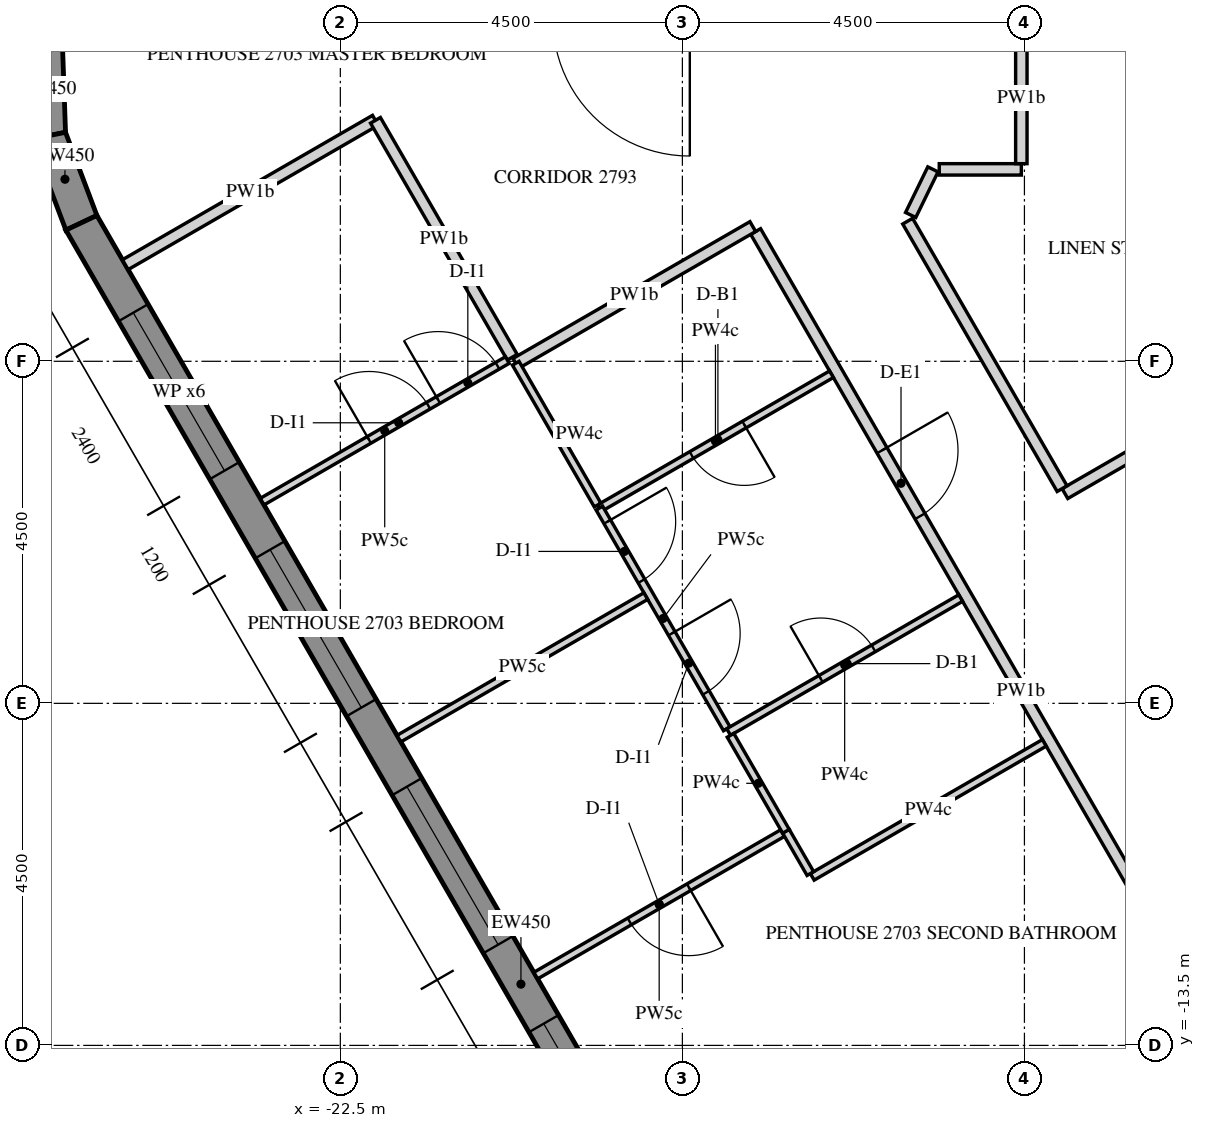
"""IFC4 building model, lengths in metres.
Left out: names, types, materials, properties, quantities, classifications, styles, units other than length and angle.
Written with IfcOpenShell. Run it as: python <this file> out.ifc"""

import sys

from ifc_helpers import new_model, si_unit, direction, frame, frame_2d, origin, place, context, subcontext, project, spatial, polyline, rectangle, outline, extrude, element, fill, save


model = new_model("IFC4")
c1 = context("Model", 3, precision=1e-05, world=origin(), true_north=direction((0.0, 1.0)))
c2 = subcontext(c1, "Body", "Model", "MODEL_VIEW")
j1 = project(units=[si_unit("LENGTHUNIT", "METRE"), si_unit("PLANEANGLEUNIT", "RADIAN")], contexts=[c1])
p1 = place(None, origin())
s1 = spatial("IfcSite", under=j1, at=p1, CompositionType="ELEMENT")
p2 = place(p1, origin())
s2 = spatial("IfcBuilding", under=s1, at=p2, CompositionType="ELEMENT")
p3 = place(p2, frame((0.0, 0.0, 353.4)))
s3 = spatial("IfcBuildingStorey", under=s2, at=p3, CompositionType="ELEMENT", Elevation=353.4)
p4 = place(p3, frame((-26.382, -0.309, -0.15), z_axis=(0.0, 0.0, 1.0), x_axis=(0.034887984255, -0.999391228976, 0.0)))
e1 = element("IfcWall", 1, at=p4, inside=s3, PredefinedType="SOLIDWALL", context=c2, shape_type="SweptSolid", body=[
    extrude(outline(polyline([(-0.037, -0.225), (1.261, -0.225), (1.188, 0.225), (0.037, 0.225), (-0.037, -0.225)])), origin(), (0.0, 0.0, 1.0), 3.9),
])
p5 = place(p3, frame((-26.339, -1.532, -0.15), z_axis=(0.0, 0.0, 1.0), x_axis=(0.353132996235, -0.935573132882, 0.0)))
e2 = element("IfcWall", 2, at=p5, inside=s3, PredefinedType="SOLIDWALL", context=c2, shape_type="SweptSolid", body=[
    extrude(outline(polyline([(-0.037, -0.225), (1.243, -0.225), (1.206, 0.225), (0.037, 0.225), (-0.037, -0.225)])), origin(), (0.0, 0.0, 1.0), 3.9),
])
p6 = place(p3, frame((-25.907, -2.678, -0.15), z_axis=(0.0, 0.0, 1.0), x_axis=(0.499997453958, -0.866026873738, 0.0)))
e3 = element("IfcWall", 3, at=p6, inside=s3, PredefinedType="SOLIDWALL", context=c2, shape_type="SweptSolid", body=[
    extrude(outline(polyline([(-0.018, -0.225), (23.152, -0.225), (23.11, 0.225), (0.018, 0.225), (-0.018, -0.225)])), origin(), (0.0, 0.0, 1.0), 3.9),
])
p7 = place(p6, frame((1.366, 0.0, 0.45)))
e4 = element("IfcOpeningElement", 4, at=p7, cuts=e3, PredefinedType="OPENING", context=c2, shape_type="SweptSolid", body=[
    extrude(rectangle(XDim=2.4, YDim=3.0, at=frame_2d((1.2, 1.5))), frame((0.0, 0.235, 0.0), z_axis=(0.0, -1.0, 0.0), x_axis=(1.0, 0.0, 0.0)), (0.0, 0.0, 1.0), 0.47),
])
p8 = place(p6, frame((4.966, 0.0, 0.45)))
e5 = element("IfcOpeningElement", 5, at=p8, cuts=e3, PredefinedType="OPENING", context=c2, shape_type="SweptSolid", body=[
    extrude(rectangle(XDim=2.4, YDim=3.0, at=frame_2d((1.2, 1.5))), frame((0.0, 0.235, 0.0), z_axis=(0.0, -1.0, 0.0), x_axis=(1.0, 0.0, 0.0)), (0.0, 0.0, 1.0), 0.47),
])
p9 = place(p6, frame((8.566, 0.0, 0.45)))
e6 = element("IfcOpeningElement", 6, at=p9, cuts=e3, PredefinedType="OPENING", context=c2, shape_type="SweptSolid", body=[
    extrude(rectangle(XDim=2.4, YDim=3.0, at=frame_2d((1.2, 1.5))), frame((0.0, 0.235, 0.0), z_axis=(0.0, -1.0, 0.0), x_axis=(1.0, 0.0, 0.0)), (0.0, 0.0, 1.0), 0.47),
])
p10 = place(p6, frame((12.166, 0.0, 0.45)))
e7 = element("IfcOpeningElement", 7, at=p10, cuts=e3, PredefinedType="OPENING", context=c2, shape_type="SweptSolid", body=[
    extrude(rectangle(XDim=2.4, YDim=3.0, at=frame_2d((1.2, 1.5))), frame((0.0, 0.235, 0.0), z_axis=(0.0, -1.0, 0.0), x_axis=(1.0, 0.0, 0.0)), (0.0, 0.0, 1.0), 0.47),
])
p11 = place(p6, frame((15.766, 0.0, 0.45)))
e8 = element("IfcOpeningElement", 8, at=p11, cuts=e3, PredefinedType="OPENING", context=c2, shape_type="SweptSolid", body=[
    extrude(rectangle(XDim=2.4, YDim=3.0, at=frame_2d((1.2, 1.5))), frame((0.0, 0.235, 0.0), z_axis=(0.0, -1.0, 0.0), x_axis=(1.0, 0.0, 0.0)), (0.0, 0.0, 1.0), 0.47),
])
p12 = place(p6, frame((19.366, 0.0, 0.45)))
e9 = element("IfcOpeningElement", 9, at=p12, cuts=e3, PredefinedType="OPENING", context=c2, shape_type="SweptSolid", body=[
    extrude(rectangle(XDim=2.4, YDim=3.0, at=frame_2d((1.2, 1.5))), frame((0.0, 0.235, 0.0), z_axis=(0.0, -1.0, 0.0), x_axis=(1.0, 0.0, 0.0)), (0.0, 0.0, 1.0), 0.47),
])
p13 = place(p3, frame((-17.036, -2.792, 0.0), z_axis=(0.0, 0.0, 1.0), x_axis=(0.500006428338, -0.86602169235, 0.0)))
e10 = element("IfcWall", 10, at=p13, inside=s3, PredefinedType="PARTITIONING", context=c2, shape_type="SweptSolid", body=[
    extrude(rectangle(XDim=13.966, YDim=0.15, at=frame_2d((6.983, 0.0))), origin(), (0.0, 0.0, 1.0), 2.82),
])
p14 = place(p13, frame((3.325, 0.0, 0.0)))
e11 = element("IfcOpeningElement", 11, at=p14, cuts=e10, PredefinedType="OPENING", context=c2, shape_type="SweptSolid", body=[
    extrude(rectangle(XDim=1.0, YDim=2.1, at=frame_2d((0.5, 1.05))), frame((0.0, 0.085, 0.0), z_axis=(0.0, -1.0, 0.0), x_axis=(1.0, 0.0, 0.0)), (0.0, 0.0, 1.0), 0.17),
])
p15 = place(p3, frame((-20.191, -4.528, 0.0), z_axis=(0.0, 0.0, 1.0), x_axis=(0.866018442252, 0.500012057535, 0.0)))
e12 = element("IfcWall", 12, at=p15, inside=s3, PredefinedType="PARTITIONING", context=c2, shape_type="SweptSolid", body=[
    extrude(rectangle(XDim=3.6, YDim=0.15, at=frame_2d((1.8, 0.0))), origin(), (0.0, 0.0, 1.0), 2.82),
])
p16 = place(p3, frame((-25.329, -3.229, 0.0), z_axis=(0.0, 0.0, 1.0), x_axis=(0.866019695343, 0.500009887181, 0.0)))
e13 = element("IfcWall", 13, at=p16, inside=s3, PredefinedType="PARTITIONING", context=c2, shape_type="SweptSolid", body=[
    extrude(rectangle(XDim=3.799, YDim=0.15, at=frame_2d((1.899, 0.0))), origin(), (0.0, 0.0, 1.0), 2.82),
])
p17 = place(p3, frame((-22.038, -1.33, 0.0), z_axis=(0.0, 0.0, 1.0), x_axis=(0.499976924066, -0.866038726271, 0.0)))
e14 = element("IfcWall", 14, at=p17, inside=s3, PredefinedType="PARTITIONING", context=c2, shape_type="SweptSolid", body=[
    extrude(rectangle(XDim=3.599, YDim=0.15, at=frame_2d((1.799, 0.0))), origin(), (0.0, 0.0, 1.0), 2.82),
])
p18 = place(p3, frame((-9.2, -4.066, 0.0), z_axis=(0.0, 0.0, 1.0), x_axis=(-0.866013608182, -0.500020430026, 0.0)))
e15 = element("IfcWall", 15, at=p18, inside=s3, PredefinedType="PARTITIONING", context=c2, shape_type="SweptSolid", body=[
    extrude(rectangle(XDim=4.35, YDim=0.15, at=frame_2d((2.175, 0.0))), origin(), (0.0, 0.0, 1.0), 2.82),
])
p19 = place(p18, frame((1.725, 0.0, 0.0)))
e16 = element("IfcOpeningElement", 16, at=p19, cuts=e15, PredefinedType="OPENING", context=c2, shape_type="SweptSolid", body=[
    extrude(rectangle(XDim=0.9, YDim=2.1, at=frame_2d((0.45, 1.05))), frame((0.0, 0.085, 0.0), z_axis=(0.0, -1.0, 0.0), x_axis=(1.0, 0.0, 0.0)), (0.0, 0.0, 1.0), 0.17),
])
p20 = place(p3, frame((-13.004, -6.176, 0.0), z_axis=(0.0, 0.0, 1.0), x_axis=(-0.500022342669, 0.866012503854, 0.0)))
e17 = element("IfcWall", 17, at=p20, inside=s3, PredefinedType="PARTITIONING", context=c2, shape_type="SweptSolid", body=[
    extrude(rectangle(XDim=4.064, YDim=0.15, at=frame_2d((2.032, 0.0))), origin(), (0.0, 0.0, 1.0), 2.82),
])
p21 = place(p3, frame((-14.997, -2.575, 0.0), z_axis=(0.0, 0.0, 1.0), x_axis=(0.438416427913, 0.898771959808, 0.0)))
e18 = element("IfcWall", 18, at=p21, inside=s3, PredefinedType="PARTITIONING", context=c2, shape_type="SweptSolid", body=[
    extrude(rectangle(XDim=0.668, YDim=0.15, at=frame_2d((0.334, 0.0))), origin(), (0.0, 0.0, 1.0), 2.82),
])
p22 = place(p3, frame((-14.62, -1.975, 0.0), z_axis=(0.0, 0.0, 1.0), x_axis=(1.0, 0.0, 0.0)))
e19 = element("IfcWall", 19, at=p22, inside=s3, PredefinedType="PARTITIONING", context=c2, shape_type="SweptSolid", body=[
    extrude(rectangle(XDim=1.08, YDim=0.15, at=frame_2d((0.54, 0.0))), origin(), (0.0, 0.0, 1.0), 2.82),
])
p23 = place(p3, frame((-13.541, -1.9, 0.0), z_axis=(0.0, 0.0, 1.0), x_axis=(0.0, 1.0, 0.0)))
e20 = element("IfcWall", 20, at=p23, inside=s3, PredefinedType="PARTITIONING", context=c2, shape_type="SweptSolid", body=[
    extrude(rectangle(XDim=1.725, YDim=0.15, at=frame_2d((0.862, 0.0))), origin(), (0.0, 0.0, 1.0), 2.82),
])
p24 = place(p3, frame((-16.681, -10.707, 0.0), z_axis=(0.0, 0.0, 1.0), x_axis=(-0.866039234136, -0.499976044363, 0.0)))
e21 = element("IfcWall", 21, at=p24, inside=s3, PredefinedType="PARTITIONING", context=c2, shape_type="SweptSolid", body=[
    extrude(rectangle(XDim=3.75, YDim=0.1, at=frame_2d((1.875, 0.0))), origin(), (0.0, 0.0, 1.0), 2.82),
])
p25 = place(p24, frame((1.425, 0.0, 0.0)))
e22 = element("IfcOpeningElement", 22, at=p25, cuts=e21, PredefinedType="OPENING", context=c2, shape_type="SweptSolid", body=[
    extrude(rectangle(XDim=0.9, YDim=2.1, at=frame_2d((0.45, 1.05))), frame((0.0, 0.06, 0.0), z_axis=(0.0, -1.0, 0.0), x_axis=(1.0, 0.0, 0.0)), (0.0, 0.0, 1.0), 0.12),
])
p26 = place(p3, frame((-13.239, -9.52, 0.0), z_axis=(0.0, 0.0, 1.0), x_axis=(-0.866031034943, -0.499990246421, 0.0)))
e23 = element("IfcWall", 23, at=p26, inside=s3, PredefinedType="PARTITIONING", context=c2, shape_type="SweptSolid", body=[
    extrude(rectangle(XDim=3.525, YDim=0.1, at=frame_2d((1.762, 0.0))), origin(), (0.0, 0.0, 1.0), 2.82),
])
p27 = place(p3, frame((-16.316, -11.239, 0.0), z_axis=(0.0, 0.0, 1.0), x_axis=(-0.499962526042, 0.866047038303, 0.0)))
e24 = element("IfcWall", 24, at=p27, inside=s3, PredefinedType="PARTITIONING", context=c2, shape_type="SweptSolid", body=[
    extrude(rectangle(XDim=0.646, YDim=0.1, at=frame_2d((0.323, 0.0))), origin(), (0.0, 0.0, 1.0), 2.82),
])
p28 = place(p3, frame((-16.039, -4.67, 0.0), z_axis=(0.0, 0.0, 1.0), x_axis=(-0.866031034943, -0.499990246421, 0.0)))
e25 = element("IfcWall", 25, at=p28, inside=s3, PredefinedType="PARTITIONING", context=c2, shape_type="SweptSolid", body=[
    extrude(rectangle(XDim=3.525, YDim=0.1, at=frame_2d((1.762, 0.0))), origin(), (0.0, 0.0, 1.0), 2.82),
])
p29 = place(p28, frame((1.325, 0.0, 0.0)))
e26 = element("IfcOpeningElement", 26, at=p29, cuts=e25, PredefinedType="OPENING", context=c2, shape_type="SweptSolid", body=[
    extrude(rectangle(XDim=0.8, YDim=2.1, at=frame_2d((0.4, 1.05))), frame((0.0, 0.06, 0.0), z_axis=(0.0, -1.0, 0.0), x_axis=(1.0, 0.0, 0.0)), (0.0, 0.0, 1.0), 0.12),
])
p30 = place(p3, frame((-19.092, -6.431, 0.0), z_axis=(0.0, 0.0, 1.0), x_axis=(0.500014404596, -0.866017087127, 0.0)))
e27 = element("IfcWall", 27, at=p30, inside=s3, PredefinedType="PARTITIONING", context=c2, shape_type="SweptSolid", body=[
    extrude(rectangle(XDim=3.354, YDim=0.1, at=frame_2d((1.677, 0.0))), origin(), (0.0, 0.0, 1.0), 2.82),
])
p31 = place(p30, frame((0.208, 0.0, 0.0)))
e28 = element("IfcOpeningElement", 28, at=p31, cuts=e27, PredefinedType="OPENING", context=c2, shape_type="SweptSolid", body=[
    extrude(rectangle(XDim=0.9, YDim=2.1, at=frame_2d((0.45, 1.05))), frame((0.0, 0.06, 0.0), z_axis=(0.0, -1.0, 0.0), x_axis=(1.0, 0.0, 0.0)), (0.0, 0.0, 1.0), 0.12),
])
p32 = place(p30, frame((1.905, 0.0, 0.0)))
e29 = element("IfcOpeningElement", 29, at=p32, cuts=e27, PredefinedType="OPENING", context=c2, shape_type="SweptSolid", body=[
    extrude(rectangle(XDim=0.9, YDim=2.1, at=frame_2d((0.45, 1.05))), frame((0.0, 0.06, 0.0), z_axis=(0.0, -1.0, 0.0), x_axis=(1.0, 0.0, 0.0)), (0.0, 0.0, 1.0), 0.12),
])
p33 = place(p3, frame((-17.391, -9.377, 0.0), z_axis=(0.0, 0.0, 1.0), x_axis=(0.866001044215, 0.500042189638, 0.0)))
e30 = element("IfcWall", 30, at=p33, inside=s3, PredefinedType="PARTITIONING", context=c2, shape_type="SweptSolid", body=[
    extrude(rectangle(XDim=3.525, YDim=0.1, at=frame_2d((1.763, 0.0))), origin(), (0.0, 0.0, 1.0), 2.82),
])
p34 = place(p33, frame((1.4, 0.0, 0.0)))
e31 = element("IfcOpeningElement", 31, at=p34, cuts=e30, PredefinedType="OPENING", context=c2, shape_type="SweptSolid", body=[
    extrude(rectangle(XDim=0.8, YDim=2.1, at=frame_2d((0.4, 1.05))), frame((0.0, 0.06, 0.0), z_axis=(0.0, -1.0, 0.0), x_axis=(1.0, 0.0, 0.0)), (0.0, 0.0, 1.0), 0.12),
])
p35 = place(p3, frame((-20.192, -4.526, 0.0), z_axis=(0.0, 0.0, 1.0), x_axis=(0.500039660922, -0.86600250433, 0.0)))
e32 = element("IfcWall", 32, at=p35, inside=s3, PredefinedType="PARTITIONING", context=c2, shape_type="SweptSolid", body=[
    extrude(rectangle(XDim=2.154, YDim=0.1, at=frame_2d((1.077, 0.0))), origin(), (0.0, 0.0, 1.0), 2.82),
])
p36 = place(p3, frame((-23.529, -6.346, 0.0), z_axis=(0.0, 0.0, 1.0), x_axis=(0.866012039196, 0.500023147432, 0.0)))
e33 = element("IfcWall", 33, at=p36, inside=s3, PredefinedType="PARTITIONING", context=c2, shape_type="SweptSolid", body=[
    extrude(rectangle(XDim=3.725, YDim=0.1, at=frame_2d((1.862, 0.0))), origin(), (0.0, 0.0, 1.0), 2.82),
])
p37 = place(p36, frame((2.675, 0.0, 0.0)))
e34 = element("IfcOpeningElement", 34, at=p37, cuts=e33, PredefinedType="OPENING", context=c2, shape_type="SweptSolid", body=[
    extrude(rectangle(XDim=0.9, YDim=2.1, at=frame_2d((0.45, 1.05))), frame((0.0, 0.06, 0.0), z_axis=(0.0, -1.0, 0.0), x_axis=(1.0, 0.0, 0.0)), (0.0, 0.0, 1.0), 0.12),
])
p38 = place(p36, frame((1.625, 0.0, 0.0)))
e35 = element("IfcOpeningElement", 35, at=p38, cuts=e33, PredefinedType="OPENING", context=c2, shape_type="SweptSolid", body=[
    extrude(rectangle(XDim=0.9, YDim=2.1, at=frame_2d((0.45, 1.05))), frame((0.0, 0.06, 0.0), z_axis=(0.0, -1.0, 0.0), x_axis=(1.0, 0.0, 0.0)), (0.0, 0.0, 1.0), 0.12),
])
p39 = place(p3, frame((-21.729, -9.464, 0.0), z_axis=(0.0, 0.0, 1.0), x_axis=(0.866022959057, 0.500004234368, 0.0)))
e36 = element("IfcWall", 36, at=p39, inside=s3, PredefinedType="PARTITIONING", context=c2, shape_type="SweptSolid", body=[
    extrude(rectangle(XDim=3.75, YDim=0.1, at=frame_2d((1.875, 0.0))), origin(), (0.0, 0.0, 1.0), 2.82),
])
p40 = place(p3, frame((-16.637, -10.684, 0.0), z_axis=(0.0, 0.0, 1.0), x_axis=(-0.500046085413, 0.865998794724, 0.0)))
e37 = element("IfcWall", 37, at=p40, inside=s3, PredefinedType="PARTITIONING", context=c2, shape_type="SweptSolid", body=[
    extrude(rectangle(XDim=1.458, YDim=0.1, at=frame_2d((0.729, 0.0))), origin(), (0.0, 0.0, 1.0), 2.82),
])
p41 = place(p7, frame((0.0, 0.155, 0.0)))
e38 = element("IfcWindow", 38, at=p41, inside=s3, PartitioningType="DOUBLE_PANEL_VERTICAL", PredefinedType="WINDOW", context=c2, shape_type="SweptSolid", body=[
    extrude(rectangle(XDim=2.4, YDim=3.0, at=frame_2d((1.2, 1.5))), frame((0.0, 0.03, 0.0), z_axis=(0.0, -1.0, 0.0), x_axis=(1.0, 0.0, 0.0)), (0.0, 0.0, 1.0), 0.06),
])
fill(e4, e38)
p42 = place(p8, frame((0.0, 0.155, 0.0)))
e39 = element("IfcWindow", 39, at=p42, inside=s3, PartitioningType="DOUBLE_PANEL_VERTICAL", PredefinedType="WINDOW", context=c2, shape_type="SweptSolid", body=[
    extrude(rectangle(XDim=2.4, YDim=3.0, at=frame_2d((1.2, 1.5))), frame((0.0, 0.03, 0.0), z_axis=(0.0, -1.0, 0.0), x_axis=(1.0, 0.0, 0.0)), (0.0, 0.0, 1.0), 0.06),
])
fill(e5, e39)
p43 = place(p9, frame((0.0, 0.155, 0.0)))
e40 = element("IfcWindow", 40, at=p43, inside=s3, PartitioningType="DOUBLE_PANEL_VERTICAL", PredefinedType="WINDOW", context=c2, shape_type="SweptSolid", body=[
    extrude(rectangle(XDim=2.4, YDim=3.0, at=frame_2d((1.2, 1.5))), frame((0.0, 0.03, 0.0), z_axis=(0.0, -1.0, 0.0), x_axis=(1.0, 0.0, 0.0)), (0.0, 0.0, 1.0), 0.06),
])
fill(e6, e40)
p44 = place(p10, frame((0.0, 0.155, 0.0)))
e41 = element("IfcWindow", 41, at=p44, inside=s3, PartitioningType="DOUBLE_PANEL_VERTICAL", PredefinedType="WINDOW", context=c2, shape_type="SweptSolid", body=[
    extrude(rectangle(XDim=2.4, YDim=3.0, at=frame_2d((1.2, 1.5))), frame((0.0, 0.03, 0.0), z_axis=(0.0, -1.0, 0.0), x_axis=(1.0, 0.0, 0.0)), (0.0, 0.0, 1.0), 0.06),
])
fill(e7, e41)
p45 = place(p14, origin())
e42 = element("IfcDoor", 42, at=p45, inside=s3, OperationType="SINGLE_SWING_RIGHT", PredefinedType="DOOR", context=c2, shape_type="SweptSolid", body=[
    extrude(rectangle(XDim=1.0, YDim=2.1, at=frame_2d((0.5, 1.05))), frame((0.0, 0.025, 0.0), z_axis=(0.0, -1.0, 0.0), x_axis=(1.0, 0.0, 0.0)), (0.0, 0.0, 1.0), 0.05),
])
fill(e11, e42)
p46 = place(p29, origin())
e43 = element("IfcDoor", 43, at=p46, inside=s3, OperationType="SINGLE_SWING_RIGHT", PredefinedType="DOOR", context=c2, shape_type="SweptSolid", body=[
    extrude(rectangle(XDim=0.8, YDim=2.1, at=frame_2d((0.4, 1.05))), frame((0.0, 0.025, 0.0), z_axis=(0.0, -1.0, 0.0), x_axis=(1.0, 0.0, 0.0)), (0.0, 0.0, 1.0), 0.05),
])
fill(e26, e43)
p47 = place(p31, origin())
e44 = element("IfcDoor", 44, at=p47, inside=s3, OperationType="SINGLE_SWING_LEFT", PredefinedType="DOOR", context=c2, shape_type="SweptSolid", body=[
    extrude(rectangle(XDim=0.9, YDim=2.1, at=frame_2d((0.45, 1.05))), frame((0.0, 0.025, 0.0), z_axis=(0.0, -1.0, 0.0), x_axis=(1.0, 0.0, 0.0)), (0.0, 0.0, 1.0), 0.05),
])
fill(e28, e44)
p48 = place(p37, origin())
e45 = element("IfcDoor", 45, at=p48, inside=s3, OperationType="SINGLE_SWING_RIGHT", PredefinedType="DOOR", context=c2, shape_type="SweptSolid", body=[
    extrude(rectangle(XDim=0.9, YDim=2.1, at=frame_2d((0.45, 1.05))), frame((0.0, 0.025, 0.0), z_axis=(0.0, -1.0, 0.0), x_axis=(1.0, 0.0, 0.0)), (0.0, 0.0, 1.0), 0.05),
])
fill(e34, e45)
p49 = place(p38, origin())
e46 = element("IfcDoor", 46, at=p49, inside=s3, OperationType="SINGLE_SWING_LEFT", PredefinedType="DOOR", context=c2, shape_type="SweptSolid", body=[
    extrude(rectangle(XDim=0.9, YDim=2.1, at=frame_2d((0.45, 1.05))), frame((0.0, 0.025, 0.0), z_axis=(0.0, -1.0, 0.0), x_axis=(1.0, 0.0, 0.0)), (0.0, 0.0, 1.0), 0.05),
])
fill(e35, e46)
p50 = place(p32, origin())
e47 = element("IfcDoor", 47, at=p50, inside=s3, OperationType="SINGLE_SWING_LEFT", PredefinedType="DOOR", context=c2, shape_type="SweptSolid", body=[
    extrude(rectangle(XDim=0.9, YDim=2.1, at=frame_2d((0.45, 1.05))), frame((0.0, 0.025, 0.0), z_axis=(0.0, -1.0, 0.0), x_axis=(1.0, 0.0, 0.0)), (0.0, 0.0, 1.0), 0.05),
])
fill(e29, e47)
p51 = place(p34, origin())
e48 = element("IfcDoor", 48, at=p51, inside=s3, OperationType="SINGLE_SWING_LEFT", PredefinedType="DOOR", context=c2, shape_type="SweptSolid", body=[
    extrude(rectangle(XDim=0.8, YDim=2.1, at=frame_2d((0.4, 1.05))), frame((0.0, 0.025, 0.0), z_axis=(0.0, -1.0, 0.0), x_axis=(1.0, 0.0, 0.0)), (0.0, 0.0, 1.0), 0.05),
])
fill(e31, e48)
p52 = place(p25, origin())
e49 = element("IfcDoor", 49, at=p52, inside=s3, OperationType="SINGLE_SWING_RIGHT", PredefinedType="DOOR", context=c2, shape_type="SweptSolid", body=[
    extrude(rectangle(XDim=0.9, YDim=2.1, at=frame_2d((0.45, 1.05))), frame((0.0, 0.025, 0.0), z_axis=(0.0, -1.0, 0.0), x_axis=(1.0, 0.0, 0.0)), (0.0, 0.0, 1.0), 0.05),
])
fill(e22, e49)
save(model, sys.argv[1])
